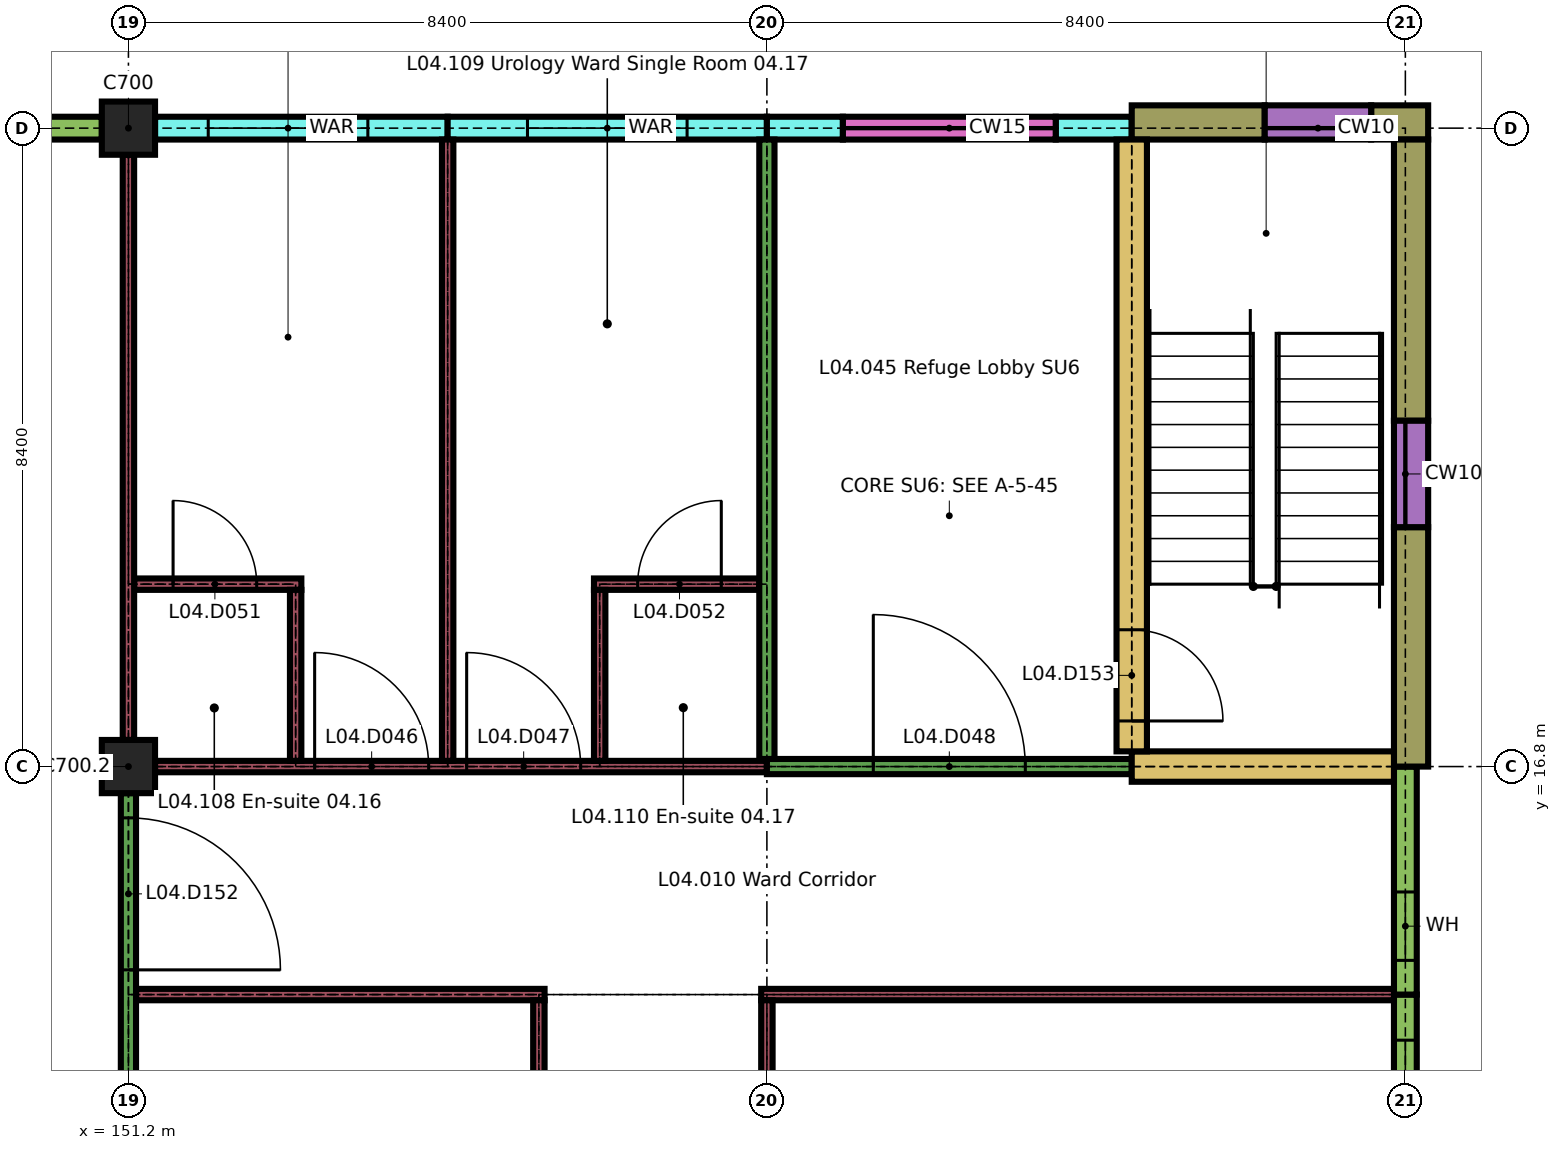
"""IFC4 building model, lengths in metres.
Left out: names, types, materials, properties, quantities, classifications, styles, units other than length and angle.
Written with IfcOpenShell. Run it as: python <this file> out.ifc"""

import sys

from ifc_helpers import new_model, si_unit, direction, frame, frame_2d, origin, origin_2d, place, context, subcontext, project, spatial, rectangle, extrude, element, fill, save


model = new_model("IFC4")
c1 = context("Model", 3, precision=1e-05, world=origin(), true_north=direction((0.0, 1.0)))
c2 = subcontext(c1, "Body", "Model", "MODEL_VIEW")
j1 = project(units=[si_unit("LENGTHUNIT", "METRE"), si_unit("PLANEANGLEUNIT", "RADIAN")], contexts=[c1])
p1 = place(None, origin())
s1 = spatial("IfcSite", under=j1, at=p1, CompositionType="ELEMENT")
p2 = place(p1, origin())
s2 = spatial("IfcBuilding", under=s1, at=p2, CompositionType="ELEMENT")
p3 = place(p2, frame((0.0, 0.0, 18.9)))
s3 = spatial("IfcBuildingStorey", under=s2, at=p3, CompositionType="ELEMENT", Elevation=18.9)
for number, where, z_axis, x_axis in (
    (1, (151.2, 16.8, 0.0), (0.0, 0.0, 1.0), (1.0, 0.0, 0.0)),
    (2, (151.2, 25.2, 0.0), (0.0, 0.0, 1.0), (1.0, 0.0, 0.0)),
):
    element("IfcColumn", number, at=place(p3, frame(where, z_axis=z_axis, x_axis=x_axis)), inside=s3, PredefinedType="COLUMN", context=c2, shape_type="SweptSolid", body=[
        extrude(rectangle(XDim=0.7, YDim=0.7, at=origin_2d()), origin(), (0.0, 0.0, 1.0), 3.26),
    ])
p4 = place(p3, frame((149.7, 25.2, 0.0), z_axis=(0.0, 0.0, 1.0), x_axis=(1.0, 0.0, 0.0)))
e3 = element("IfcWall", 3, at=p4, inside=s3, PredefinedType="SOLIDWALL", context=c2, shape_type="SweptSolid", body=[
    extrude(rectangle(XDim=1.15, YDim=0.3, at=frame_2d((0.575, 0.0))), origin(), (0.0, 0.0, 1.0), 2.96),
])
p5 = place(p3, frame((151.55, 25.2, 0.0), z_axis=(0.0, 0.0, 1.0), x_axis=(1.0, 0.0, 0.0)))
e4 = element("IfcWall", 4, at=p5, inside=s3, PredefinedType="SOLIDWALL", context=c2, shape_type="SweptSolid", body=[
    extrude(rectangle(XDim=3.85, YDim=0.3, at=frame_2d((1.925, 0.0))), origin(), (0.0, 0.0, 1.0), 3.26),
])
p6 = place(p5, frame((0.7, 0.0, 0.9)))
e5 = element("IfcOpeningElement", 5, at=p6, cuts=e4, PredefinedType="OPENING", context=c2, shape_type="SweptSolid", body=[
    extrude(rectangle(XDim=2.1, YDim=1.5, at=frame_2d((1.05, 0.75))), frame((0.0, 0.16, 0.0), z_axis=(0.0, -1.0, 0.0), x_axis=(1.0, 0.0, 0.0)), (0.0, 0.0, 1.0), 0.32),
])
p7 = place(p3, frame((155.4, 25.2, 0.0), z_axis=(0.0, 0.0, 1.0), x_axis=(1.0, 0.0, 0.0)))
e6 = element("IfcWall", 6, at=p7, inside=s3, PredefinedType="SOLIDWALL", context=c2, shape_type="SweptSolid", body=[
    extrude(rectangle(XDim=4.2, YDim=0.3, at=frame_2d((2.1, 0.0))), origin(), (0.0, 0.0, 1.0), 3.26),
])
p8 = place(p7, frame((1.05, 0.0, 0.9)))
e7 = element("IfcOpeningElement", 7, at=p8, cuts=e6, PredefinedType="OPENING", context=c2, shape_type="SweptSolid", body=[
    extrude(rectangle(XDim=2.1, YDim=1.5, at=frame_2d((1.05, 0.75))), frame((0.0, 0.16, 0.0), z_axis=(0.0, -1.0, 0.0), x_axis=(1.0, 0.0, 0.0)), (0.0, 0.0, 1.0), 0.32),
])
for number, where, z_axis, x_axis in (
    (8, (159.6, 25.2, 0.0), (0.0, 0.0, 1.0), (1.0, 0.0, 0.0)),
    (9, (163.4, 25.2, 0.0), (0.0, 0.0, 1.0), (1.0, 0.0, 0.0)),
):
    element("IfcWall", number, at=place(p3, frame(where, z_axis=z_axis, x_axis=x_axis)), inside=s3, PredefinedType="SOLIDWALL", context=c2, shape_type="SweptSolid", body=[
        extrude(rectangle(XDim=1.0, YDim=0.3, at=frame_2d((0.5, 0.0))), origin(), (0.0, 0.0, 1.0), 3.26),
    ])
p9 = place(p3, frame((160.6, 25.2, 0.0), z_axis=(0.0, 0.0, 1.0), x_axis=(1.0, 0.0, 0.0)))
e10 = element("IfcWall", 10, at=p9, inside=s3, PredefinedType="SOLIDWALL", context=c2, shape_type="SweptSolid", body=[
    extrude(rectangle(XDim=2.8, YDim=0.3, at=frame_2d((1.4, 0.0))), origin(), (0.0, 0.0, 1.0), 0.6),
])
p10 = place(p3, frame((164.4, 25.275, 0.0), z_axis=(0.0, 0.0, 1.0), x_axis=(1.0, 0.0, 0.0)))
e11 = element("IfcWall", 11, at=p10, inside=s3, PredefinedType="SOLIDWALL", context=c2, shape_type="SweptSolid", body=[
    extrude(rectangle(XDim=1.75, YDim=0.45, at=frame_2d((0.875, 0.0))), origin(), (0.0, 0.0, 1.0), 3.26),
])
p11 = place(p3, frame((167.55, 25.275, 0.0), z_axis=(0.0, 0.0, 1.0), x_axis=(1.0, 0.0, 0.0)))
e12 = element("IfcWall", 12, at=p11, inside=s3, PredefinedType="SOLIDWALL", context=c2, shape_type="SweptSolid", body=[
    extrude(rectangle(XDim=0.75, YDim=0.45, at=frame_2d((0.375, 0.0))), origin(), (0.0, 0.0, 1.0), 3.26),
])
p12 = place(p3, frame((166.15, 25.275, 0.0), z_axis=(0.0, 0.0, 1.0), x_axis=(1.0, 0.0, 0.0)))
e13 = element("IfcWall", 13, at=p12, inside=s3, PredefinedType="SOLIDWALL", context=c2, shape_type="SweptSolid", body=[
    extrude(rectangle(XDim=1.4, YDim=0.45, at=frame_2d((0.7, 0.0))), origin(), (0.0, 0.0, 1.0), 0.6),
])
p13 = place(p3, frame((168.0, 11.4, 0.0), z_axis=(0.0, 0.0, 1.0), x_axis=(0.0, 1.0, 0.0)))
e14 = element("IfcWall", 14, at=p13, inside=s3, PredefinedType="SOLIDWALL", context=c2, shape_type="SweptSolid", body=[
    extrude(rectangle(XDim=2.4, YDim=0.3, at=frame_2d((1.2, 0.0))), origin(), (0.0, 0.0, 1.0), 2.96),
])
p14 = place(p13, frame((0.6, 0.0, 0.9)))
e15 = element("IfcOpeningElement", 15, at=p14, cuts=e14, PredefinedType="OPENING", context=c2, shape_type="SweptSolid", body=[
    extrude(rectangle(XDim=1.2, YDim=1.5, at=frame_2d((0.6, 0.75))), frame((0.0, 0.16, 0.0), z_axis=(0.0, -1.0, 0.0), x_axis=(1.0, 0.0, 0.0)), (0.0, 0.0, 1.0), 0.32),
])
p15 = place(p3, frame((168.0, 13.8, 0.0), z_axis=(0.0, 0.0, 1.0), x_axis=(0.0, 1.0, 0.0)))
e16 = element("IfcWall", 16, at=p15, inside=s3, PredefinedType="SOLIDWALL", context=c2, shape_type="SweptSolid", body=[
    extrude(rectangle(XDim=3.0, YDim=0.3, at=frame_2d((1.5, 0.0))), origin(), (0.0, 0.0, 1.0), 2.96),
])
p16 = place(p15, frame((0.45, 0.0, 0.9)))
e17 = element("IfcOpeningElement", 17, at=p16, cuts=e16, PredefinedType="OPENING", context=c2, shape_type="SweptSolid", body=[
    extrude(rectangle(XDim=0.9, YDim=1.5, at=frame_2d((0.45, 0.75))), frame((0.0, 0.16, 0.0), z_axis=(0.0, -1.0, 0.0), x_axis=(1.0, 0.0, 0.0)), (0.0, 0.0, 1.0), 0.32),
])
p17 = place(p3, frame((168.075, 16.8, 0.0), z_axis=(0.0, 0.0, 1.0), x_axis=(0.0, 1.0, 0.0)))
e18 = element("IfcWall", 18, at=p17, inside=s3, PredefinedType="SOLIDWALL", context=c2, shape_type="SweptSolid", body=[
    extrude(rectangle(XDim=3.15, YDim=0.45, at=frame_2d((1.575, 0.0))), origin(), (0.0, 0.0, 1.0), 3.26),
])
p18 = place(p3, frame((168.075, 21.35, 0.0), z_axis=(0.0, 0.0, 1.0), x_axis=(0.0, 1.0, 0.0)))
e19 = element("IfcWall", 19, at=p18, inside=s3, PredefinedType="SOLIDWALL", context=c2, shape_type="SweptSolid", body=[
    extrude(rectangle(XDim=3.7, YDim=0.45, at=frame_2d((1.85, 0.0))), origin(), (0.0, 0.0, 1.0), 3.26),
])
p19 = place(p3, frame((168.075, 19.95, 0.0), z_axis=(0.0, 0.0, 1.0), x_axis=(0.0, 1.0, 0.0)))
e20 = element("IfcWall", 20, at=p19, inside=s3, PredefinedType="SOLIDWALL", context=c2, shape_type="SweptSolid", body=[
    extrude(rectangle(XDim=1.4, YDim=0.45, at=frame_2d((0.7, 0.0))), origin(), (0.0, 0.0, 1.0), 0.6),
])
p20 = place(p3, frame((151.3, 13.8, 0.0), z_axis=(0.0, 0.0, 1.0), x_axis=(1.0, 0.0, 0.0)))
e21 = element("IfcWall", 21, at=p20, inside=s3, PredefinedType="PARTITIONING", context=c2, shape_type="SweptSolid", body=[
    extrude(rectangle(XDim=5.375, YDim=0.15, at=frame_2d((2.688, 0.0))), origin(), (0.0, 0.0, 1.0), 3.26),
])
p21 = place(p3, frame((159.525, 13.8, 0.0), z_axis=(0.0, 0.0, 1.0), x_axis=(1.0, 0.0, 0.0)))
e22 = element("IfcWall", 22, at=p21, inside=s3, PredefinedType="PARTITIONING", context=c2, shape_type="SweptSolid", body=[
    extrude(rectangle(XDim=8.325, YDim=0.15, at=frame_2d((4.163, 0.0))), origin(), (0.0, 0.0, 1.0), 3.26),
])
p22 = place(p3, frame((151.55, 16.8, 0.0), z_axis=(0.0, 0.0, 1.0), x_axis=(1.0, 0.0, 0.0)))
e23 = element("IfcWall", 23, at=p22, inside=s3, PredefinedType="PARTITIONING", context=c2, shape_type="SweptSolid", body=[
    extrude(rectangle(XDim=8.05, YDim=0.15, at=frame_2d((4.025, 0.0))), origin(), (0.0, 0.0, 1.0), 3.26),
])
p23 = place(p22, frame((2.1, 0.0, 0.0)))
e24 = element("IfcOpeningElement", 24, at=p23, cuts=e23, PredefinedType="OPENING", context=c2, shape_type="SweptSolid", body=[
    extrude(rectangle(XDim=1.5, YDim=2.4, at=frame_2d((0.75, 1.2))), frame((0.0, 0.085, 0.0), z_axis=(0.0, -1.0, 0.0), x_axis=(1.0, 0.0, 0.0)), (0.0, 0.0, 1.0), 0.17),
])
p24 = place(p22, frame((4.1, 0.0, 0.0)))
e25 = element("IfcOpeningElement", 25, at=p24, cuts=e23, PredefinedType="OPENING", context=c2, shape_type="SweptSolid", body=[
    extrude(rectangle(XDim=1.5, YDim=2.4, at=frame_2d((0.75, 1.2))), frame((0.0, 0.085, 0.0), z_axis=(0.0, -1.0, 0.0), x_axis=(1.0, 0.0, 0.0)), (0.0, 0.0, 1.0), 0.17),
])
p25 = place(p3, frame((159.6, 16.8, 0.0), z_axis=(0.0, 0.0, 1.0), x_axis=(1.0, 0.0, 0.0)))
e26 = element("IfcWall", 26, at=p25, inside=s3, PredefinedType="PARTITIONING", context=c2, shape_type="SweptSolid", body=[
    extrude(rectangle(XDim=4.8, YDim=0.2, at=frame_2d((2.4, 0.0))), origin(), (0.0, 0.0, 1.0), 3.26),
])
p26 = place(p25, frame((1.4, 0.0, 0.0)))
e27 = element("IfcOpeningElement", 27, at=p26, cuts=e26, PredefinedType="OPENING", context=c2, shape_type="SweptSolid", body=[
    extrude(rectangle(XDim=2.0, YDim=2.4, at=frame_2d((1.0, 1.2))), frame((0.0, 0.11, 0.0), z_axis=(0.0, -1.0, 0.0), x_axis=(1.0, 0.0, 0.0)), (0.0, 0.0, 1.0), 0.22),
])
p27 = place(p3, frame((164.4, 16.8, 0.0), z_axis=(0.0, 0.0, 1.0), x_axis=(1.0, 0.0, 0.0)))
e28 = element("IfcWall", 28, at=p27, inside=s3, PredefinedType="SHEAR", context=c2, shape_type="SweptSolid", body=[
    extrude(rectangle(XDim=3.45, YDim=0.4, at=frame_2d((1.725, 0.0))), origin(), (0.0, 0.0, 1.0), 3.26),
])
p28 = place(p3, frame((151.275, 19.2, 0.0), z_axis=(0.0, 0.0, 1.0), x_axis=(1.0, 0.0, 0.0)))
e29 = element("IfcWall", 29, at=p28, inside=s3, PredefinedType="PARTITIONING", context=c2, shape_type="SweptSolid", body=[
    extrude(rectangle(XDim=2.2, YDim=0.15, at=frame_2d((1.1, 0.0))), origin(), (0.0, 0.0, 1.0), 3.26),
])
p29 = place(p28, frame((0.512, 0.0, 0.0)))
e30 = element("IfcOpeningElement", 30, at=p29, cuts=e29, PredefinedType="OPENING", context=c2, shape_type="SweptSolid", body=[
    extrude(rectangle(XDim=1.1, YDim=2.1, at=frame_2d((0.55, 1.05))), frame((0.0, 0.085, 0.0), z_axis=(0.0, -1.0, 0.0), x_axis=(1.0, 0.0, 0.0)), (0.0, 0.0, 1.0), 0.17),
])
p30 = place(p3, frame((157.325, 19.2, 0.0), z_axis=(0.0, 0.0, 1.0), x_axis=(1.0, 0.0, 0.0)))
e31 = element("IfcWall", 31, at=p30, inside=s3, PredefinedType="PARTITIONING", context=c2, shape_type="SweptSolid", body=[
    extrude(rectangle(XDim=2.175, YDim=0.15, at=frame_2d((1.087, 0.0))), origin(), (0.0, 0.0, 1.0), 3.26),
])
p31 = place(p30, frame((0.575, 0.0, 0.0)))
e32 = element("IfcOpeningElement", 32, at=p31, cuts=e31, PredefinedType="OPENING", context=c2, shape_type="SweptSolid", body=[
    extrude(rectangle(XDim=1.1, YDim=2.1, at=frame_2d((0.55, 1.05))), frame((0.0, 0.085, 0.0), z_axis=(0.0, -1.0, 0.0), x_axis=(1.0, 0.0, 0.0)), (0.0, 0.0, 1.0), 0.17),
])
p32 = place(p3, frame((151.2, 8.75, 0.0), z_axis=(0.0, 0.0, 1.0), x_axis=(0.0, 1.0, 0.0)))
e33 = element("IfcWall", 33, at=p32, inside=s3, PredefinedType="PARTITIONING", context=c2, shape_type="SweptSolid", body=[
    extrude(rectangle(XDim=7.7, YDim=0.2, at=frame_2d((3.85, 0.0))), origin(), (0.0, 0.0, 1.0), 3.26),
])
p33 = place(p32, frame((0.325, 0.0, 0.0)))
e34 = element("IfcOpeningElement", 34, at=p33, cuts=e33, PredefinedType="OPENING", context=c2, shape_type="SweptSolid", body=[
    extrude(rectangle(XDim=2.0, YDim=2.4, at=frame_2d((1.0, 1.2))), frame((0.0, 0.11, 0.0), z_axis=(0.0, -1.0, 0.0), x_axis=(1.0, 0.0, 0.0)), (0.0, 0.0, 1.0), 0.22),
])
p34 = place(p32, frame((5.375, 0.0, 0.0)))
e35 = element("IfcOpeningElement", 35, at=p34, cuts=e33, PredefinedType="OPENING", context=c2, shape_type="SweptSolid", body=[
    extrude(rectangle(XDim=2.0, YDim=2.4, at=frame_2d((1.0, 1.2))), frame((0.0, 0.11, 0.0), z_axis=(0.0, -1.0, 0.0), x_axis=(1.0, 0.0, 0.0)), (0.0, 0.0, 1.0), 0.22),
])
p35 = place(p3, frame((151.2, 17.15, 0.0), z_axis=(0.0, 0.0, 1.0), x_axis=(0.0, 1.0, 0.0)))
e36 = element("IfcWall", 36, at=p35, inside=s3, PredefinedType="PARTITIONING", context=c2, shape_type="SweptSolid", body=[
    extrude(rectangle(XDim=7.7, YDim=0.15, at=frame_2d((3.85, 0.0))), origin(), (0.0, 0.0, 1.0), 3.26),
])
p36 = place(p3, frame((153.4, 16.875, 0.0), z_axis=(0.0, 0.0, 1.0), x_axis=(0.0, 1.0, 0.0)))
e37 = element("IfcWall", 37, at=p36, inside=s3, PredefinedType="PARTITIONING", context=c2, shape_type="SweptSolid", body=[
    extrude(rectangle(XDim=2.25, YDim=0.15, at=frame_2d((1.125, 0.0))), origin(), (0.0, 0.0, 1.0), 3.26),
])
p37 = place(p3, frame((155.4, 16.875, 0.0), z_axis=(0.0, 0.0, 1.0), x_axis=(0.0, 1.0, 0.0)))
e38 = element("IfcWall", 38, at=p37, inside=s3, PredefinedType="PARTITIONING", context=c2, shape_type="SweptSolid", body=[
    extrude(rectangle(XDim=8.175, YDim=0.15, at=frame_2d((4.087, 0.0))), origin(), (0.0, 0.0, 1.0), 3.26),
])
p38 = place(p3, frame((156.6, 11.4, 0.0), z_axis=(0.0, 0.0, 1.0), x_axis=(0.0, 1.0, 0.0)))
e39 = element("IfcWall", 39, at=p38, inside=s3, PredefinedType="PARTITIONING", context=c2, shape_type="SweptSolid", body=[
    extrude(rectangle(XDim=2.325, YDim=0.15, at=frame_2d((1.163, 0.0))), origin(), (0.0, 0.0, 1.0), 3.26),
])
p39 = place(p3, frame((157.4, 16.875, 0.0), z_axis=(0.0, 0.0, 1.0), x_axis=(0.0, 1.0, 0.0)))
e40 = element("IfcWall", 40, at=p39, inside=s3, PredefinedType="PARTITIONING", context=c2, shape_type="SweptSolid", body=[
    extrude(rectangle(XDim=2.25, YDim=0.15, at=frame_2d((1.125, 0.0))), origin(), (0.0, 0.0, 1.0), 3.26),
])
p40 = place(p3, frame((159.6, 11.4, 0.0), z_axis=(0.0, 0.0, 1.0), x_axis=(0.0, 1.0, 0.0)))
e41 = element("IfcWall", 41, at=p40, inside=s3, PredefinedType="PARTITIONING", context=c2, shape_type="SweptSolid", body=[
    extrude(rectangle(XDim=2.325, YDim=0.15, at=frame_2d((1.163, 0.0))), origin(), (0.0, 0.0, 1.0), 3.26),
])
p41 = place(p3, frame((159.6, 16.9, 0.0), z_axis=(0.0, 0.0, 1.0), x_axis=(0.0, 1.0, 0.0)))
e42 = element("IfcWall", 42, at=p41, inside=s3, PredefinedType="PARTITIONING", context=c2, shape_type="SweptSolid", body=[
    extrude(rectangle(XDim=8.15, YDim=0.2, at=frame_2d((4.075, 0.0))), origin(), (0.0, 0.0, 1.0), 3.26),
])
p42 = place(p3, frame((164.4, 17.0, 0.0), z_axis=(0.0, 0.0, 1.0), x_axis=(0.0, 1.0, 0.0)))
e43 = element("IfcWall", 43, at=p42, inside=s3, PredefinedType="SHEAR", context=c2, shape_type="SweptSolid", body=[
    extrude(rectangle(XDim=8.05, YDim=0.4, at=frame_2d((4.025, 0.0))), origin(), (0.0, 0.0, 1.0), 3.26),
])
p43 = place(p42, frame((0.4, 0.0, 0.0)))
e44 = element("IfcOpeningElement", 44, at=p43, cuts=e43, PredefinedType="OPENING", context=c2, shape_type="SweptSolid", body=[
    extrude(rectangle(XDim=1.2, YDim=2.1, at=frame_2d((0.6, 1.05))), frame((0.0, 0.21, 0.0), z_axis=(0.0, -1.0, 0.0), x_axis=(1.0, 0.0, 0.0)), (0.0, 0.0, 1.0), 0.42),
])
p44 = place(p6, origin())
e45 = element("IfcWindow", 45, at=p44, inside=s3, PartitioningType="DOUBLE_PANEL_VERTICAL", PredefinedType="WINDOW", context=c2, shape_type="SweptSolid", body=[
    extrude(rectangle(XDim=2.1, YDim=1.5, at=frame_2d((1.05, 0.75))), frame((0.0, 0.05, 0.0), z_axis=(0.0, -1.0, 0.0), x_axis=(1.0, 0.0, 0.0)), (0.0, 0.0, 1.0), 0.1),
])
fill(e5, e45)
p45 = place(p8, origin())
e46 = element("IfcWindow", 46, at=p45, inside=s3, PartitioningType="DOUBLE_PANEL_VERTICAL", PredefinedType="WINDOW", context=c2, shape_type="SweptSolid", body=[
    extrude(rectangle(XDim=2.1, YDim=1.5, at=frame_2d((1.05, 0.75))), frame((0.0, 0.05, 0.0), z_axis=(0.0, -1.0, 0.0), x_axis=(1.0, 0.0, 0.0)), (0.0, 0.0, 1.0), 0.1),
])
fill(e7, e46)
p46 = place(p14, origin())
e47 = element("IfcWindow", 47, at=p46, inside=s3, PartitioningType="SINGLE_PANEL", PredefinedType="WINDOW", context=c2, shape_type="SweptSolid", body=[
    extrude(rectangle(XDim=1.2, YDim=1.5, at=frame_2d((0.6, 0.75))), frame((0.0, 0.03, 0.0), z_axis=(0.0, -1.0, 0.0), x_axis=(1.0, 0.0, 0.0)), (0.0, 0.0, 1.0), 0.06),
])
fill(e15, e47)
p47 = place(p16, origin())
e48 = element("IfcWindow", 48, at=p47, inside=s3, PartitioningType="SINGLE_PANEL", PredefinedType="WINDOW", context=c2, shape_type="SweptSolid", body=[
    extrude(rectangle(XDim=0.9, YDim=1.5, at=frame_2d((0.45, 0.75))), frame((0.0, 0.03, 0.0), z_axis=(0.0, -1.0, 0.0), x_axis=(1.0, 0.0, 0.0)), (0.0, 0.0, 1.0), 0.06),
])
fill(e17, e48)
p48 = place(p23, origin())
e49 = element("IfcDoor", 49, at=p48, inside=s3, OperationType="SINGLE_SWING_RIGHT", PredefinedType="DOOR", context=c2, shape_type="SweptSolid", body=[
    extrude(rectangle(XDim=1.5, YDim=2.4, at=frame_2d((0.75, 1.2))), frame((0.0, 0.03, 0.0), z_axis=(0.0, -1.0, 0.0), x_axis=(1.0, 0.0, 0.0)), (0.0, 0.0, 1.0), 0.06),
])
fill(e24, e49)
p49 = place(p24, origin())
e50 = element("IfcDoor", 50, at=p49, inside=s3, OperationType="SINGLE_SWING_RIGHT", PredefinedType="DOOR", context=c2, shape_type="SweptSolid", body=[
    extrude(rectangle(XDim=1.5, YDim=2.4, at=frame_2d((0.75, 1.2))), frame((0.0, 0.03, 0.0), z_axis=(0.0, -1.0, 0.0), x_axis=(1.0, 0.0, 0.0)), (0.0, 0.0, 1.0), 0.06),
])
fill(e25, e50)
p50 = place(p26, origin())
e51 = element("IfcDoor", 51, at=p50, inside=s3, OperationType="SINGLE_SWING_RIGHT", PredefinedType="DOOR", context=c2, shape_type="SweptSolid", body=[
    extrude(rectangle(XDim=2.0, YDim=2.4, at=frame_2d((1.0, 1.2))), frame((0.0, 0.03, 0.0), z_axis=(0.0, -1.0, 0.0), x_axis=(1.0, 0.0, 0.0)), (0.0, 0.0, 1.0), 0.06),
])
fill(e27, e51)
p51 = place(p29, origin())
e52 = element("IfcDoor", 52, at=p51, inside=s3, OperationType="SINGLE_SWING_RIGHT", PredefinedType="DOOR", context=c2, shape_type="SweptSolid", body=[
    extrude(rectangle(XDim=1.1, YDim=2.1, at=frame_2d((0.55, 1.05))), frame((0.0, 0.025, 0.0), z_axis=(0.0, -1.0, 0.0), x_axis=(1.0, 0.0, 0.0)), (0.0, 0.0, 1.0), 0.05),
])
fill(e30, e52)
p52 = place(p31, origin())
e53 = element("IfcDoor", 53, at=p52, inside=s3, OperationType="SINGLE_SWING_LEFT", PredefinedType="DOOR", context=c2, shape_type="SweptSolid", body=[
    extrude(rectangle(XDim=1.1, YDim=2.1, at=frame_2d((0.55, 1.05))), frame((0.0, 0.025, 0.0), z_axis=(0.0, -1.0, 0.0), x_axis=(1.0, 0.0, 0.0)), (0.0, 0.0, 1.0), 0.05),
])
fill(e32, e53)
p53 = place(p34, origin())
e54 = element("IfcDoor", 54, at=p53, inside=s3, OperationType="SINGLE_SWING_LEFT", PredefinedType="DOOR", context=c2, shape_type="SweptSolid", body=[
    extrude(rectangle(XDim=2.0, YDim=2.4, at=frame_2d((1.0, 1.2))), frame((0.0, 0.03, 0.0), z_axis=(0.0, -1.0, 0.0), x_axis=(1.0, 0.0, 0.0)), (0.0, 0.0, 1.0), 0.06),
])
fill(e35, e54)
p54 = place(p43, origin())
e55 = element("IfcDoor", 55, at=p54, inside=s3, OperationType="SINGLE_SWING_LEFT", PredefinedType="DOOR", context=c2, shape_type="SweptSolid", body=[
    extrude(rectangle(XDim=1.2, YDim=2.1, at=frame_2d((0.6, 1.05))), frame((0.0, 0.025, 0.0), z_axis=(0.0, -1.0, 0.0), x_axis=(1.0, 0.0, 0.0)), (0.0, 0.0, 1.0), 0.05),
])
fill(e44, e55)
save(model, sys.argv[1])
